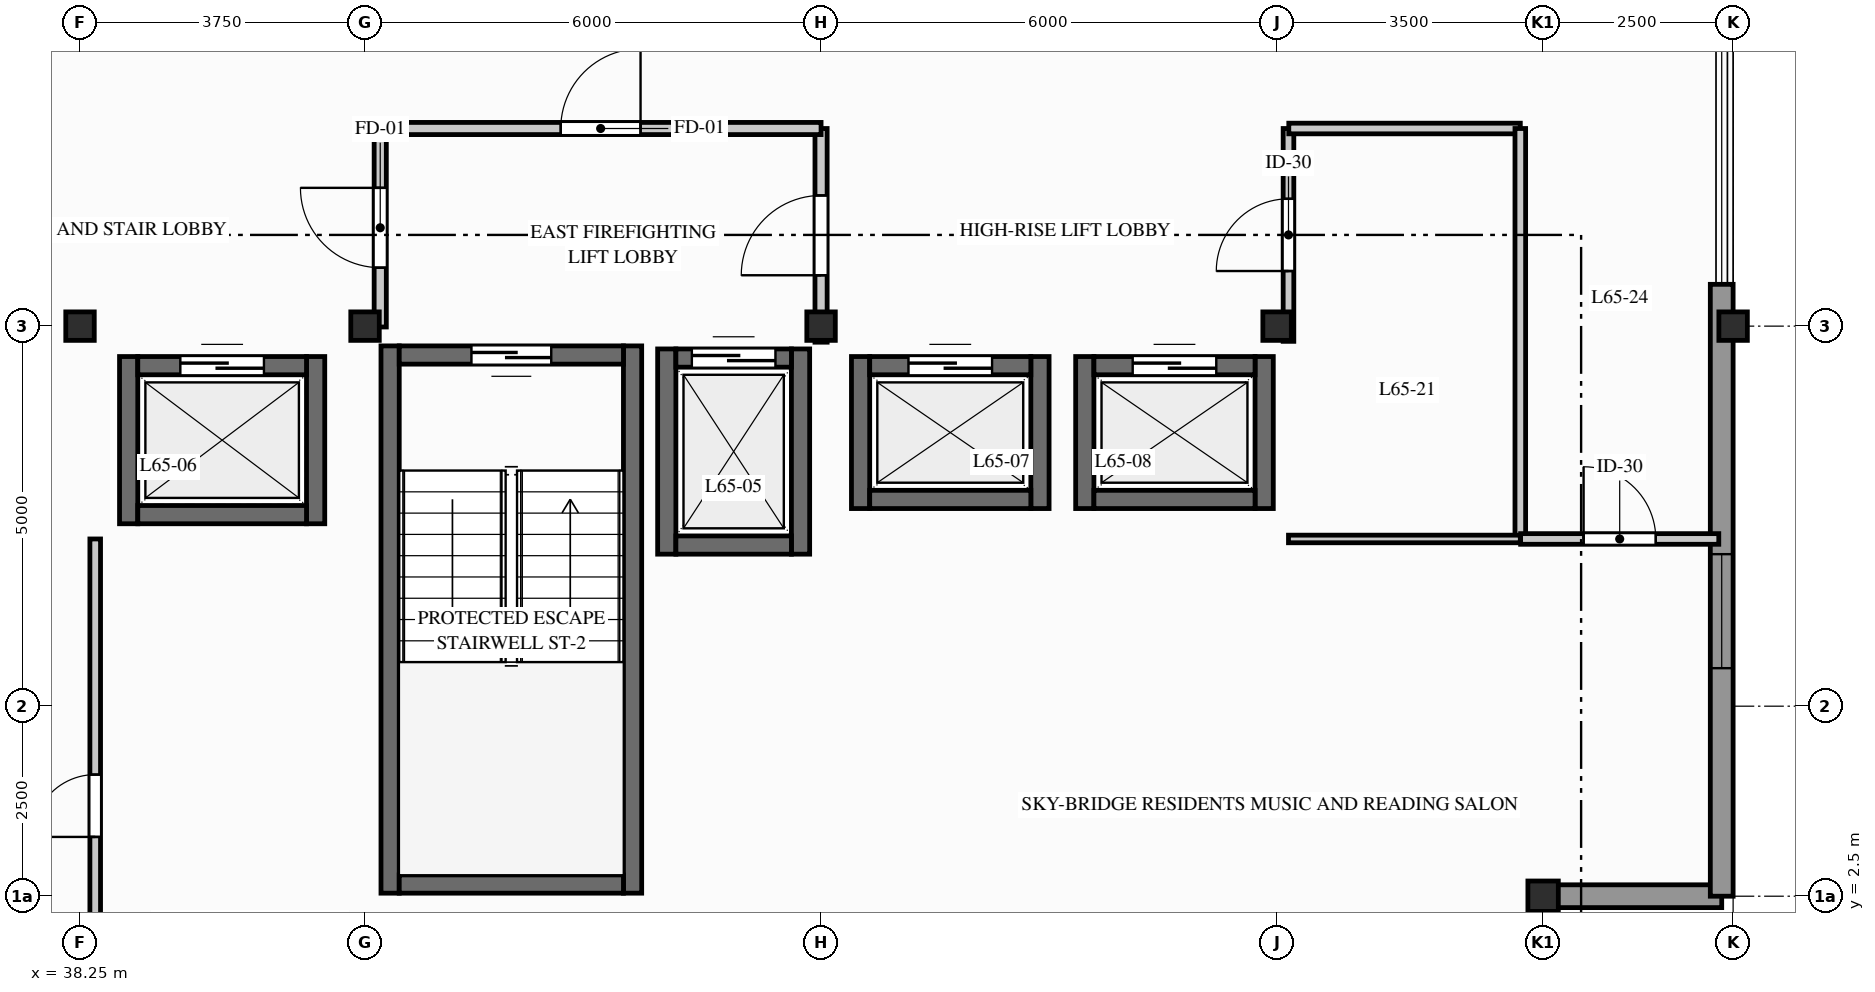
"""IFC4 building model, lengths in metres.
Left out: names, types, materials, properties, quantities, classifications, styles, units other than length and angle.
Written with IfcOpenShell. Run it as: python <this file> out.ifc"""

import sys

from ifc_helpers import new_model, si_unit, direction, frame, frame_2d, origin, origin_2d, place, context, subcontext, project, spatial, rectangle, hollow_rectangle, i_section, extrude, element, fill, save


model = new_model("IFC4")
c1 = context("Model", 3, precision=1e-05, world=origin(), true_north=direction((0.0, 1.0)))
c2 = subcontext(c1, "Body", "Model", "MODEL_VIEW")
j1 = project(units=[si_unit("LENGTHUNIT", "METRE"), si_unit("PLANEANGLEUNIT", "RADIAN")], contexts=[c1])
p1 = place(None, origin())
s1 = spatial("IfcSite", under=j1, at=p1, CompositionType="ELEMENT")
p2 = place(p1, origin())
s2 = spatial("IfcBuilding", under=s1, at=p2, CompositionType="ELEMENT")
p3 = place(p2, frame((0.0, 0.0, 214.4)))
s3 = spatial("IfcBuildingStorey", under=s2, at=p3, CompositionType="ELEMENT", Elevation=214.4)
for number, where, z_axis, x_axis in (
    (1, (38.25, 10.0, 0.0), (0.0, 0.0, 1.0), (1.0, 0.0, 0.0)),
    (2, (42.0, 10.0, 0.0), (0.0, 0.0, 1.0), (1.0, 0.0, 0.0)),
    (3, (48.0, 10.0, 0.0), (0.0, 0.0, 1.0), (1.0, 0.0, 0.0)),
    (4, (54.0, 10.0, 0.0), (0.0, 0.0, 1.0), (1.0, 0.0, 0.0)),
):
    element("IfcColumn", number, at=place(p3, frame(where, z_axis=z_axis, x_axis=x_axis)), inside=s3, PredefinedType="COLUMN", context=c2, shape_type="SweptSolid", body=[
        extrude(i_section(OverallWidth=0.375, OverallDepth=0.375, WebThickness=0.017, FlangeThickness=0.027, FilletRadius=0.015, at=origin_2d()), origin(), (0.0, 0.0, 1.0), 3.6),
    ])
p4 = place(p3, frame((57.5, 2.5, 0.0), z_axis=(0.0, 0.0, 1.0), x_axis=(1.0, 0.0, 0.0)))
e5 = element("IfcColumn", 5, at=p4, inside=s3, PredefinedType="COLUMN", context=c2, shape_type="SweptSolid", body=[
    extrude(hollow_rectangle(XDim=0.4, YDim=0.4, WallThickness=0.02, InnerFilletRadius=0.012, OuterFilletRadius=0.024, at=origin_2d()), origin(), (0.0, 0.0, 1.0), 3.6),
])
p5 = place(p3, frame((60.0, 10.0, 0.0), z_axis=(0.0, 0.0, 1.0), x_axis=(1.0, 0.0, 0.0)))
e6 = element("IfcColumn", 6, at=p5, inside=s3, PredefinedType="COLUMN", context=c2, shape_type="SweptSolid", body=[
    extrude(i_section(OverallWidth=0.375, OverallDepth=0.375, WebThickness=0.017, FlangeThickness=0.027, FilletRadius=0.015, at=origin_2d()), origin(), (0.0, 0.0, 1.0), 3.6),
])
for number, where, z_axis, x_axis in (
    (7, (57.5, 0.15, 0.0), (0.0, 0.0, 1.0), (0.0, 1.0, 0.0)),
    (8, (57.5, 2.5, 0.0), (0.0, 0.0, 1.0), (1.0, 0.0, 0.0)),
):
    element("IfcWall", number, at=place(p3, frame(where, z_axis=z_axis, x_axis=x_axis)), inside=s3, PredefinedType="STANDARD", context=c2, shape_type="SweptSolid", body=[
        extrude(rectangle(XDim=2.35, YDim=0.3, at=frame_2d((1.175, 0.0))), origin(), (0.0, 0.0, 1.0), 3.33),
    ])
p6 = place(p3, frame((59.85, 2.5, 0.0), z_axis=(0.0, 0.0, 1.0), x_axis=(0.0, 1.0, 0.0)))
e9 = element("IfcWall", 9, at=p6, inside=s3, PredefinedType="STANDARD", context=c2, shape_type="SweptSolid", body=[
    extrude(rectangle(XDim=8.05, YDim=0.3, at=frame_2d((4.025, 0.0))), origin(), (0.0, 0.0, 1.0), 3.33),
])
p7 = place(p6, frame((3.0, 0.0, 0.95)))
e10 = element("IfcOpeningElement", 10, at=p7, cuts=e9, PredefinedType="OPENING", context=c2, shape_type="SweptSolid", body=[
    extrude(rectangle(XDim=1.5, YDim=1.8, at=frame_2d((0.75, 0.9))), frame((0.0, 0.16, 0.0), z_axis=(0.0, -1.0, 0.0), x_axis=(1.0, 0.0, 0.0)), (0.0, 0.0, 1.0), 0.32),
])
for number, where, z_axis, x_axis in (
    (11, (42.33, 2.54, 0.0), (0.0, 0.0, 1.0), (0.0, 1.0, 0.0)),
    (12, (45.52, 2.54, 0.0), (0.0, 0.0, 1.0), (0.0, 1.0, 0.0)),
):
    element("IfcWall", number, at=place(p3, frame(where, z_axis=z_axis, x_axis=x_axis)), inside=s3, PredefinedType="SHEAR", context=c2, shape_type="SweptSolid", body=[
        extrude(rectangle(XDim=7.2, YDim=0.24, at=frame_2d((3.6, 0.0))), origin(), (0.0, 0.0, 1.0), 3.33),
    ])
p8 = place(p3, frame((42.45, 2.66, 0.0), z_axis=(0.0, 0.0, 1.0), x_axis=(1.0, 0.0, 0.0)))
e13 = element("IfcWall", 13, at=p8, inside=s3, PredefinedType="SHEAR", context=c2, shape_type="SweptSolid", body=[
    extrude(rectangle(XDim=2.95, YDim=0.24, at=frame_2d((1.475, 0.0))), origin(), (0.0, 0.0, 1.0), 3.33),
])
p9 = place(p3, frame((45.4, 9.62, 0.0), z_axis=(0.0, 0.0, 1.0), x_axis=(-1.0, 0.0, 0.0)))
e14 = element("IfcWall", 14, at=p9, inside=s3, PredefinedType="SHEAR", context=c2, shape_type="SweptSolid", body=[
    extrude(rectangle(XDim=2.95, YDim=0.24, at=frame_2d((1.475, 0.0))), origin(), (0.0, 0.0, 1.0), 3.33),
])
p10 = place(p9, frame((0.95, 0.0, 0.0)))
e15 = element("IfcOpeningElement", 15, at=p10, cuts=e14, PredefinedType="OPENING", context=c2, shape_type="SweptSolid", body=[
    extrude(rectangle(XDim=1.05, YDim=2.06, at=frame_2d((0.525, 1.03))), frame((0.0, 0.13, 0.0), z_axis=(0.0, -1.0, 0.0), x_axis=(1.0, 0.0, 0.0)), (0.0, 0.0, 1.0), 0.26),
])
for number, where, z_axis, x_axis in (
    (16, (45.97, 7.0, 0.0), (0.0, 0.0, 1.0), (0.0, 1.0, 0.0)),
    (17, (47.73, 7.0, 0.0), (0.0, 0.0, 1.0), (0.0, 1.0, 0.0)),
):
    element("IfcWall", number, at=place(p3, frame(where, z_axis=z_axis, x_axis=x_axis)), inside=s3, PredefinedType="SHEAR", context=c2, shape_type="SweptSolid", body=[
        extrude(rectangle(XDim=2.7, YDim=0.24, at=frame_2d((1.35, 0.0))), origin(), (0.0, 0.0, 1.0), 3.33),
    ])
p11 = place(p3, frame((46.09, 7.12, 0.0), z_axis=(0.0, 0.0, 1.0), x_axis=(1.0, 0.0, 0.0)))
e18 = element("IfcWall", 18, at=p11, inside=s3, PredefinedType="SHEAR", context=c2, shape_type="SweptSolid", body=[
    extrude(rectangle(XDim=1.52, YDim=0.24, at=frame_2d((0.76, 0.0))), origin(), (0.0, 0.0, 1.0), 3.33),
])
p12 = place(p3, frame((46.09, 9.58, 0.0), z_axis=(0.0, 0.0, 1.0), x_axis=(1.0, 0.0, 0.0)))
e19 = element("IfcWall", 19, at=p12, inside=s3, PredefinedType="SHEAR", context=c2, shape_type="SweptSolid", body=[
    extrude(rectangle(XDim=1.52, YDim=0.24, at=frame_2d((0.76, 0.0))), origin(), (0.0, 0.0, 1.0), 3.33),
])
p13 = place(p12, frame((0.21, 0.0, 0.0)))
e20 = element("IfcOpeningElement", 20, at=p13, cuts=e19, PredefinedType="OPENING", context=c2, shape_type="SweptSolid", body=[
    extrude(rectangle(XDim=1.1, YDim=2.06, at=frame_2d((0.55, 1.03))), frame((0.0, 0.13, 0.0), z_axis=(0.0, -1.0, 0.0), x_axis=(1.0, 0.0, 0.0)), (0.0, 0.0, 1.0), 0.26),
])
for number, where, z_axis, x_axis in (
    (21, (38.89, 7.4, 0.0), (0.0, 0.0, 1.0), (0.0, 1.0, 0.0)),
    (22, (41.35, 7.4, 0.0), (0.0, 0.0, 1.0), (0.0, 1.0, 0.0)),
):
    element("IfcWall", number, at=place(p3, frame(where, z_axis=z_axis, x_axis=x_axis)), inside=s3, PredefinedType="SHEAR", context=c2, shape_type="SweptSolid", body=[
        extrude(rectangle(XDim=2.2, YDim=0.24, at=frame_2d((1.1, 0.0))), origin(), (0.0, 0.0, 1.0), 3.33),
    ])
p14 = place(p3, frame((39.01, 7.52, 0.0), z_axis=(0.0, 0.0, 1.0), x_axis=(1.0, 0.0, 0.0)))
e23 = element("IfcWall", 23, at=p14, inside=s3, PredefinedType="SHEAR", context=c2, shape_type="SweptSolid", body=[
    extrude(rectangle(XDim=2.22, YDim=0.24, at=frame_2d((1.11, 0.0))), origin(), (0.0, 0.0, 1.0), 3.33),
])
p15 = place(p3, frame((39.01, 9.48, 0.0), z_axis=(0.0, 0.0, 1.0), x_axis=(1.0, 0.0, 0.0)))
e24 = element("IfcWall", 24, at=p15, inside=s3, PredefinedType="SHEAR", context=c2, shape_type="SweptSolid", body=[
    extrude(rectangle(XDim=2.22, YDim=0.24, at=frame_2d((1.11, 0.0))), origin(), (0.0, 0.0, 1.0), 3.33),
])
p16 = place(p15, frame((0.56, 0.0, 0.0)))
e25 = element("IfcOpeningElement", 25, at=p16, cuts=e24, PredefinedType="OPENING", context=c2, shape_type="SweptSolid", body=[
    extrude(rectangle(XDim=1.1, YDim=2.06, at=frame_2d((0.55, 1.03))), frame((0.0, 0.13, 0.0), z_axis=(0.0, -1.0, 0.0), x_axis=(1.0, 0.0, 0.0)), (0.0, 0.0, 1.0), 0.26),
])
for number, where, z_axis, x_axis in (
    (26, (48.52, 7.6, 0.0), (0.0, 0.0, 1.0), (0.0, 1.0, 0.0)),
    (27, (50.88, 7.6, 0.0), (0.0, 0.0, 1.0), (0.0, 1.0, 0.0)),
):
    element("IfcWall", number, at=place(p3, frame(where, z_axis=z_axis, x_axis=x_axis)), inside=s3, PredefinedType="SHEAR", context=c2, shape_type="SweptSolid", body=[
        extrude(rectangle(XDim=2.0, YDim=0.24, at=frame_2d((1.0, 0.0))), origin(), (0.0, 0.0, 1.0), 3.33),
    ])
p17 = place(p3, frame((48.64, 7.72, 0.0), z_axis=(0.0, 0.0, 1.0), x_axis=(1.0, 0.0, 0.0)))
e28 = element("IfcWall", 28, at=p17, inside=s3, PredefinedType="SHEAR", context=c2, shape_type="SweptSolid", body=[
    extrude(rectangle(XDim=2.12, YDim=0.24, at=frame_2d((1.06, 0.0))), origin(), (0.0, 0.0, 1.0), 3.33),
])
p18 = place(p3, frame((48.64, 9.48, 0.0), z_axis=(0.0, 0.0, 1.0), x_axis=(1.0, 0.0, 0.0)))
e29 = element("IfcWall", 29, at=p18, inside=s3, PredefinedType="SHEAR", context=c2, shape_type="SweptSolid", body=[
    extrude(rectangle(XDim=2.12, YDim=0.24, at=frame_2d((1.06, 0.0))), origin(), (0.0, 0.0, 1.0), 3.33),
])
p19 = place(p18, frame((0.51, 0.0, 0.0)))
e30 = element("IfcOpeningElement", 30, at=p19, cuts=e29, PredefinedType="OPENING", context=c2, shape_type="SweptSolid", body=[
    extrude(rectangle(XDim=1.1, YDim=2.06, at=frame_2d((0.55, 1.03))), frame((0.0, 0.13, 0.0), z_axis=(0.0, -1.0, 0.0), x_axis=(1.0, 0.0, 0.0)), (0.0, 0.0, 1.0), 0.26),
])
for number, where, z_axis, x_axis in (
    (31, (51.47, 7.6, 0.0), (0.0, 0.0, 1.0), (0.0, 1.0, 0.0)),
    (32, (53.83, 7.6, 0.0), (0.0, 0.0, 1.0), (0.0, 1.0, 0.0)),
):
    element("IfcWall", number, at=place(p3, frame(where, z_axis=z_axis, x_axis=x_axis)), inside=s3, PredefinedType="SHEAR", context=c2, shape_type="SweptSolid", body=[
        extrude(rectangle(XDim=2.0, YDim=0.24, at=frame_2d((1.0, 0.0))), origin(), (0.0, 0.0, 1.0), 3.33),
    ])
p20 = place(p3, frame((51.59, 7.72, 0.0), z_axis=(0.0, 0.0, 1.0), x_axis=(1.0, 0.0, 0.0)))
e33 = element("IfcWall", 33, at=p20, inside=s3, PredefinedType="SHEAR", context=c2, shape_type="SweptSolid", body=[
    extrude(rectangle(XDim=2.12, YDim=0.24, at=frame_2d((1.06, 0.0))), origin(), (0.0, 0.0, 1.0), 3.33),
])
p21 = place(p3, frame((51.59, 9.48, 0.0), z_axis=(0.0, 0.0, 1.0), x_axis=(1.0, 0.0, 0.0)))
e34 = element("IfcWall", 34, at=p21, inside=s3, PredefinedType="SHEAR", context=c2, shape_type="SweptSolid", body=[
    extrude(rectangle(XDim=2.12, YDim=0.24, at=frame_2d((1.06, 0.0))), origin(), (0.0, 0.0, 1.0), 3.33),
])
p22 = place(p21, frame((0.51, 0.0, 0.0)))
e35 = element("IfcOpeningElement", 35, at=p22, cuts=e34, PredefinedType="OPENING", context=c2, shape_type="SweptSolid", body=[
    extrude(rectangle(XDim=1.1, YDim=2.06, at=frame_2d((0.55, 1.03))), frame((0.0, 0.13, 0.0), z_axis=(0.0, -1.0, 0.0), x_axis=(1.0, 0.0, 0.0)), (0.0, 0.0, 1.0), 0.26),
])
p23 = place(p3, frame((38.45, 0.18, 0.0), z_axis=(0.0, 0.0, 1.0), x_axis=(0.0, 1.0, 0.0)))
e36 = element("IfcWall", 36, at=p23, inside=s3, PredefinedType="PARTITIONING", context=c2, shape_type="SweptSolid", body=[
    extrude(rectangle(XDim=7.02, YDim=0.14, at=frame_2d((3.51, 0.0))), origin(), (0.0, 0.0, 1.0), 2.685),
])
p24 = place(p23, frame((3.1, 0.0, 0.0)))
e37 = element("IfcOpeningElement", 37, at=p24, cuts=e36, PredefinedType="OPENING", context=c2, shape_type="SweptSolid", body=[
    extrude(rectangle(XDim=0.82, YDim=2.02, at=frame_2d((0.41, 1.01))), frame((0.0, 0.08, 0.0), z_axis=(0.0, -1.0, 0.0), x_axis=(1.0, 0.0, 0.0)), (0.0, 0.0, 1.0), 0.16),
])
p25 = place(p3, frame((42.2, 9.989, 0.0), z_axis=(0.0, 0.0, 1.0), x_axis=(0.0, 1.0, 0.0)))
e38 = element("IfcWall", 38, at=p25, inside=s3, PredefinedType="PARTITIONING", context=c2, shape_type="SweptSolid", body=[
    extrude(rectangle(XDim=2.611, YDim=0.16, at=frame_2d((1.306, 0.0))), origin(), (0.0, 0.0, 1.0), 2.685),
])
p26 = place(p25, frame((0.781, 0.0, 0.0)))
e39 = element("IfcOpeningElement", 39, at=p26, cuts=e38, PredefinedType="OPENING", context=c2, shape_type="SweptSolid", body=[
    extrude(rectangle(XDim=1.05, YDim=2.06, at=frame_2d((0.525, 1.03))), frame((0.0, 0.09, 0.0), z_axis=(0.0, -1.0, 0.0), x_axis=(1.0, 0.0, 0.0)), (0.0, 0.0, 1.0), 0.18),
])
p27 = place(p3, frame((48.0, 9.789, 0.0), z_axis=(0.0, 0.0, 1.0), x_axis=(0.0, 1.0, 0.0)))
e40 = element("IfcWall", 40, at=p27, inside=s3, PredefinedType="PARTITIONING", context=c2, shape_type="SweptSolid", body=[
    extrude(rectangle(XDim=2.811, YDim=0.16, at=frame_2d((1.406, 0.0))), origin(), (0.0, 0.0, 1.0), 2.685),
])
p28 = place(p27, frame((0.881, 0.0, 0.0)))
e41 = element("IfcOpeningElement", 41, at=p28, cuts=e40, PredefinedType="OPENING", context=c2, shape_type="SweptSolid", body=[
    extrude(rectangle(XDim=1.05, YDim=2.06, at=frame_2d((0.525, 1.03))), frame((0.0, 0.09, 0.0), z_axis=(0.0, -1.0, 0.0), x_axis=(1.0, 0.0, 0.0)), (0.0, 0.0, 1.0), 0.18),
])
p29 = place(p3, frame((42.2, 12.6, 0.0), z_axis=(0.0, 0.0, 1.0), x_axis=(1.0, 0.0, 0.0)))
e42 = element("IfcWall", 42, at=p29, inside=s3, PredefinedType="PARTITIONING", context=c2, shape_type="SweptSolid", body=[
    extrude(rectangle(XDim=5.8, YDim=0.16, at=frame_2d((2.9, 0.0))), origin(), (0.0, 0.0, 1.0), 2.685),
])
p30 = place(p29, frame((2.375, 0.0, 0.0)))
e43 = element("IfcOpeningElement", 43, at=p30, cuts=e42, PredefinedType="OPENING", context=c2, shape_type="SweptSolid", body=[
    extrude(rectangle(XDim=1.05, YDim=2.06, at=frame_2d((0.525, 1.03))), frame((0.0, 0.09, 0.0), z_axis=(0.0, -1.0, 0.0), x_axis=(1.0, 0.0, 0.0)), (0.0, 0.0, 1.0), 0.18),
])
p31 = place(p3, frame((54.15, 9.8, 0.0), z_axis=(0.0, 0.0, 1.0), x_axis=(0.0, 1.0, 0.0)))
e44 = element("IfcWall", 44, at=p31, inside=s3, PredefinedType="PARTITIONING", context=c2, shape_type="SweptSolid", body=[
    extrude(rectangle(XDim=2.8, YDim=0.14, at=frame_2d((1.4, 0.0))), origin(), (0.0, 0.0, 1.0), 2.685),
])
p32 = place(p31, frame((0.925, 0.0, 0.0)))
e45 = element("IfcOpeningElement", 45, at=p32, cuts=e44, PredefinedType="OPENING", context=c2, shape_type="SweptSolid", body=[
    extrude(rectangle(XDim=0.95, YDim=2.05, at=frame_2d((0.475, 1.025))), frame((0.0, 0.08, 0.0), z_axis=(0.0, -1.0, 0.0), x_axis=(1.0, 0.0, 0.0)), (0.0, 0.0, 1.0), 0.16),
])
p33 = place(p3, frame((54.154, 12.6, 0.0), z_axis=(0.0, 0.0, 1.0), x_axis=(1.0, 0.0, 0.0)))
e46 = element("IfcWall", 46, at=p33, inside=s3, PredefinedType="PARTITIONING", context=c2, shape_type="SweptSolid", body=[
    extrude(rectangle(XDim=3.046, YDim=0.14, at=frame_2d((1.523, 0.0))), origin(), (0.0, 0.0, 1.0), 2.685),
])
p34 = place(p3, frame((57.2, 7.2, 0.0), z_axis=(0.0, 0.0, 1.0), x_axis=(0.0, 1.0, 0.0)))
e47 = element("IfcWall", 47, at=p34, inside=s3, PredefinedType="PARTITIONING", context=c2, shape_type="SweptSolid", body=[
    extrude(rectangle(XDim=5.4, YDim=0.14, at=frame_2d((2.7, 0.0))), origin(), (0.0, 0.0, 1.0), 2.685),
])
p35 = place(p3, frame((54.15, 7.2, 0.0), z_axis=(0.0, 0.0, 1.0), x_axis=(1.0, 0.0, 0.0)))
e48 = element("IfcWall", 48, at=p35, inside=s3, PredefinedType="PARTITIONING", context=c2, shape_type="SweptSolid", body=[
    extrude(rectangle(XDim=3.05, YDim=0.1, at=frame_2d((1.525, 0.0))), origin(), (0.0, 0.0, 1.0), 2.685),
])
p36 = place(p3, frame((57.204, 7.2, 0.0), z_axis=(0.0, 0.0, 1.0), x_axis=(1.0, 0.0, 0.0)))
e49 = element("IfcWall", 49, at=p36, inside=s3, PredefinedType="PARTITIONING", context=c2, shape_type="SweptSolid", body=[
    extrude(rectangle(XDim=2.607, YDim=0.14, at=frame_2d((1.304, 0.0))), origin(), (0.0, 0.0, 1.0), 3.33),
])
p37 = place(p36, frame((0.829, 0.0, 0.0)))
e50 = element("IfcOpeningElement", 50, at=p37, cuts=e49, PredefinedType="OPENING", context=c2, shape_type="SweptSolid", body=[
    extrude(rectangle(XDim=0.95, YDim=2.05, at=frame_2d((0.475, 1.025))), frame((0.0, 0.08, 0.0), z_axis=(0.0, -1.0, 0.0), x_axis=(1.0, 0.0, 0.0)), (0.0, 0.0, 1.0), 0.16),
])
p38 = place(p7, origin())
e51 = element("IfcWindow", 51, at=p38, inside=s3, PartitioningType="SINGLE_PANEL", PredefinedType="WINDOW", context=c2, shape_type="SweptSolid", body=[
    extrude(rectangle(XDim=1.5, YDim=1.8, at=frame_2d((0.75, 0.9))), frame((0.0, 0.03, 0.0), z_axis=(0.0, -1.0, 0.0), x_axis=(1.0, 0.0, 0.0)), (0.0, 0.0, 1.0), 0.06),
])
fill(e10, e51)
p39 = place(p10, origin())
e52 = element("IfcDoor", 52, at=p39, inside=s3, OperationType="SINGLE_SWING_RIGHT", PredefinedType="DOOR", context=c2, shape_type="SweptSolid", body=[
    extrude(rectangle(XDim=1.05, YDim=2.06, at=frame_2d((0.525, 1.03))), frame((0.0, 0.025, 0.0), z_axis=(0.0, -1.0, 0.0), x_axis=(1.0, 0.0, 0.0)), (0.0, 0.0, 1.0), 0.05),
])
fill(e15, e52)
p40 = place(p13, origin())
e53 = element("IfcDoor", 53, at=p40, inside=s3, OperationType="SLIDING_TO_RIGHT", PredefinedType="DOOR", context=c2, shape_type="SweptSolid", body=[
    extrude(rectangle(XDim=1.1, YDim=2.06, at=frame_2d((0.55, 1.03))), frame((0.0, 0.025, 0.0), z_axis=(0.0, -1.0, 0.0), x_axis=(1.0, 0.0, 0.0)), (0.0, 0.0, 1.0), 0.05),
])
fill(e20, e53)
p41 = place(p16, origin())
e54 = element("IfcDoor", 54, at=p41, inside=s3, OperationType="SLIDING_TO_LEFT", PredefinedType="DOOR", context=c2, shape_type="SweptSolid", body=[
    extrude(rectangle(XDim=1.1, YDim=2.06, at=frame_2d((0.55, 1.03))), frame((0.0, 0.025, 0.0), z_axis=(0.0, -1.0, 0.0), x_axis=(1.0, 0.0, 0.0)), (0.0, 0.0, 1.0), 0.05),
])
fill(e25, e54)
p42 = place(p19, origin())
e55 = element("IfcDoor", 55, at=p42, inside=s3, OperationType="SLIDING_TO_RIGHT", PredefinedType="DOOR", context=c2, shape_type="SweptSolid", body=[
    extrude(rectangle(XDim=1.1, YDim=2.06, at=frame_2d((0.55, 1.03))), frame((0.0, 0.025, 0.0), z_axis=(0.0, -1.0, 0.0), x_axis=(1.0, 0.0, 0.0)), (0.0, 0.0, 1.0), 0.05),
])
fill(e30, e55)
p43 = place(p22, origin())
e56 = element("IfcDoor", 56, at=p43, inside=s3, OperationType="SLIDING_TO_LEFT", PredefinedType="DOOR", context=c2, shape_type="SweptSolid", body=[
    extrude(rectangle(XDim=1.1, YDim=2.06, at=frame_2d((0.55, 1.03))), frame((0.0, 0.025, 0.0), z_axis=(0.0, -1.0, 0.0), x_axis=(1.0, 0.0, 0.0)), (0.0, 0.0, 1.0), 0.05),
])
fill(e35, e56)
p44 = place(p26, origin())
e57 = element("IfcDoor", 57, at=p44, inside=s3, OperationType="SINGLE_SWING_RIGHT", PredefinedType="DOOR", context=c2, shape_type="SweptSolid", body=[
    extrude(rectangle(XDim=1.05, YDim=2.06, at=frame_2d((0.525, 1.03))), frame((0.0, 0.025, 0.0), z_axis=(0.0, -1.0, 0.0), x_axis=(1.0, 0.0, 0.0)), (0.0, 0.0, 1.0), 0.05),
])
fill(e39, e57)
p45 = place(p28, origin())
e58 = element("IfcDoor", 58, at=p45, inside=s3, OperationType="SINGLE_SWING_LEFT", PredefinedType="DOOR", context=c2, shape_type="SweptSolid", body=[
    extrude(rectangle(XDim=1.05, YDim=2.06, at=frame_2d((0.525, 1.03))), frame((0.0, 0.025, 0.0), z_axis=(0.0, -1.0, 0.0), x_axis=(1.0, 0.0, 0.0)), (0.0, 0.0, 1.0), 0.05),
])
fill(e41, e58)
p46 = place(p30, origin())
e59 = element("IfcDoor", 59, at=p46, inside=s3, OperationType="SINGLE_SWING_RIGHT", PredefinedType="DOOR", context=c2, shape_type="SweptSolid", body=[
    extrude(rectangle(XDim=1.05, YDim=2.06, at=frame_2d((0.525, 1.03))), frame((0.0, 0.025, 0.0), z_axis=(0.0, -1.0, 0.0), x_axis=(1.0, 0.0, 0.0)), (0.0, 0.0, 1.0), 0.05),
])
fill(e43, e59)
p47 = place(p32, origin())
e60 = element("IfcDoor", 60, at=p47, inside=s3, OperationType="SINGLE_SWING_LEFT", PredefinedType="DOOR", context=c2, shape_type="SweptSolid", body=[
    extrude(rectangle(XDim=0.95, YDim=2.05, at=frame_2d((0.475, 1.025))), frame((0.0, 0.025, 0.0), z_axis=(0.0, -1.0, 0.0), x_axis=(1.0, 0.0, 0.0)), (0.0, 0.0, 1.0), 0.05),
])
fill(e45, e60)
p48 = place(p37, origin())
e61 = element("IfcDoor", 61, at=p48, inside=s3, OperationType="SINGLE_SWING_LEFT", PredefinedType="DOOR", context=c2, shape_type="SweptSolid", body=[
    extrude(rectangle(XDim=0.95, YDim=2.05, at=frame_2d((0.475, 1.025))), frame((0.0, 0.025, 0.0), z_axis=(0.0, -1.0, 0.0), x_axis=(1.0, 0.0, 0.0)), (0.0, 0.0, 1.0), 0.05),
])
fill(e50, e61)
p49 = place(p24, origin())
e62 = element("IfcDoor", 62, at=p49, inside=s3, OperationType="SINGLE_SWING_LEFT", PredefinedType="DOOR", context=c2, shape_type="SweptSolid", body=[
    extrude(rectangle(XDim=0.82, YDim=2.02, at=frame_2d((0.41, 1.01))), frame((0.0, 0.025, 0.0), z_axis=(0.0, -1.0, 0.0), x_axis=(1.0, 0.0, 0.0)), (0.0, 0.0, 1.0), 0.05),
])
fill(e37, e62)
save(model, sys.argv[1])
